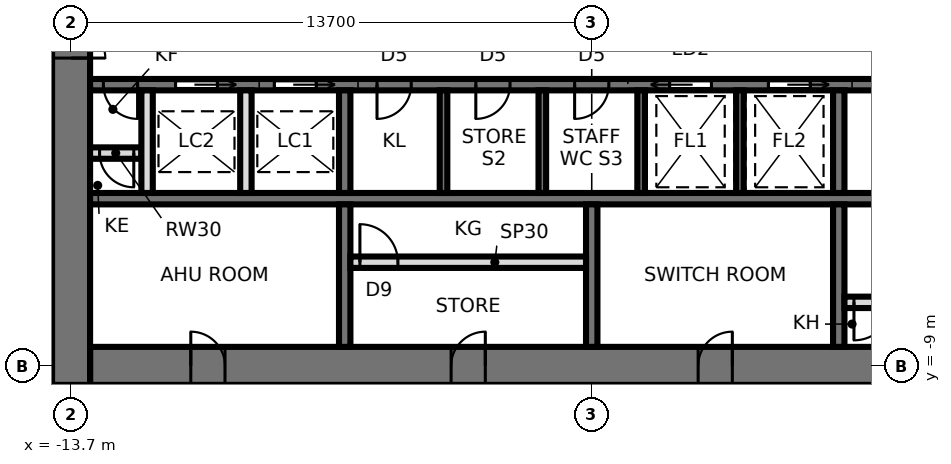
"""IFC4 building model, lengths in metres.
Left out: names, types, materials, properties, quantities, classifications, styles, units other than length and angle.
Written with IfcOpenShell. Run it as: python <this file> out.ifc"""

import sys

from ifc_helpers import new_model, si_unit, direction, frame, frame_2d, origin, place, context, subcontext, project, spatial, rectangle, extrude, element, fill, save


model = new_model("IFC4")
c1 = context("Model", 3, precision=1e-05, world=origin(), true_north=direction((0.0, 1.0)))
c2 = subcontext(c1, "Body", "Model", "MODEL_VIEW")
j1 = project(units=[si_unit("LENGTHUNIT", "METRE"), si_unit("PLANEANGLEUNIT", "RADIAN")], contexts=[c1])
p1 = place(None, origin())
s1 = spatial("IfcSite", under=j1, at=p1, CompositionType="ELEMENT")
p2 = place(p1, origin())
s2 = spatial("IfcBuilding", under=s1, at=p2, CompositionType="ELEMENT")
p3 = place(p2, frame((0.0, 0.0, 195.5)))
s3 = spatial("IfcBuildingStorey", under=s2, at=p3, CompositionType="ELEMENT", Elevation=195.5)
p4 = place(p3, frame((-13.2, -9.0, 0.0), z_axis=(0.0, 0.0, 1.0), x_axis=(1.0, 0.0, 0.0)))
e1 = element("IfcWall", 1, at=p4, inside=s3, PredefinedType="SHEAR", context=c2, shape_type="SweptSolid", body=[
    extrude(rectangle(XDim=26.4, YDim=1.0, at=frame_2d((13.2, 0.0))), origin(), (0.0, 0.0, 1.0), 3.9),
])
p5 = place(p4, frame((2.65, 0.0, 0.0)))
e2 = element("IfcOpeningElement", 2, at=p5, cuts=e1, PredefinedType="OPENING", context=c2, shape_type="SweptSolid", body=[
    extrude(rectangle(XDim=0.9, YDim=2.1, at=frame_2d((0.45, 1.05))), frame((0.0, 0.51, 0.0), z_axis=(0.0, -1.0, 0.0), x_axis=(1.0, 0.0, 0.0)), (0.0, 0.0, 1.0), 1.02),
])
p6 = place(p4, frame((9.5, 0.0, 0.0)))
e3 = element("IfcOpeningElement", 3, at=p6, cuts=e1, PredefinedType="OPENING", context=c2, shape_type="SweptSolid", body=[
    extrude(rectangle(XDim=0.9, YDim=2.1, at=frame_2d((0.45, 1.05))), frame((0.0, 0.51, 0.0), z_axis=(0.0, -1.0, 0.0), x_axis=(1.0, 0.0, 0.0)), (0.0, 0.0, 1.0), 1.02),
])
p7 = place(p4, frame((16.0, 0.0, 0.0)))
e4 = element("IfcOpeningElement", 4, at=p7, cuts=e1, PredefinedType="OPENING", context=c2, shape_type="SweptSolid", body=[
    extrude(rectangle(XDim=0.9, YDim=2.1, at=frame_2d((0.45, 1.05))), frame((0.0, 0.51, 0.0), z_axis=(0.0, -1.0, 0.0), x_axis=(1.0, 0.0, 0.0)), (0.0, 0.0, 1.0), 1.02),
])
p8 = place(p4, frame((22.85, 0.0, 0.0)))
e5 = element("IfcOpeningElement", 5, at=p8, cuts=e1, PredefinedType="OPENING", context=c2, shape_type="SweptSolid", body=[
    extrude(rectangle(XDim=0.9, YDim=2.1, at=frame_2d((0.45, 1.05))), frame((0.0, 0.51, 0.0), z_axis=(0.0, -1.0, 0.0), x_axis=(1.0, 0.0, 0.0)), (0.0, 0.0, 1.0), 1.02),
])
p9 = place(p3, frame((-13.7, 9.5, 0.0), z_axis=(0.0, 0.0, 1.0), x_axis=(0.0, -1.0, 0.0)))
e6 = element("IfcWall", 6, at=p9, inside=s3, PredefinedType="SHEAR", context=c2, shape_type="SweptSolid", body=[
    extrude(rectangle(XDim=19.0, YDim=1.0, at=frame_2d((9.5, 0.0))), origin(), (0.0, 0.0, 1.0), 3.9),
])
p10 = place(p9, frame((8.6, 0.0, 0.0)))
e7 = element("IfcOpeningElement", 7, at=p10, cuts=e6, PredefinedType="OPENING", context=c2, shape_type="SweptSolid", body=[
    extrude(rectangle(XDim=1.8, YDim=2.4, at=frame_2d((0.9, 1.2))), frame((0.0, 0.51, 0.0), z_axis=(0.0, -1.0, 0.0), x_axis=(1.0, 0.0, 0.0)), (0.0, 0.0, 1.0), 1.02),
])
p11 = place(p3, frame((-13.2, -1.6, 0.0), z_axis=(0.0, 0.0, 1.0), x_axis=(1.0, 0.0, 0.0)))
e8 = element("IfcWall", 8, at=p11, inside=s3, PredefinedType="SHEAR", context=c2, shape_type="SweptSolid", body=[
    extrude(rectangle(XDim=26.4, YDim=0.3, at=frame_2d((13.2, 0.0))), origin(), (0.0, 0.0, 1.0), 3.9),
])
p12 = place(p11, frame((25.15, 0.0, 0.0)))
e9 = element("IfcOpeningElement", 9, at=p12, cuts=e8, PredefinedType="OPENING", context=c2, shape_type="SweptSolid", body=[
    extrude(rectangle(XDim=1.0, YDim=2.1, at=frame_2d((0.5, 1.05))), frame((0.0, 0.16, 0.0), z_axis=(0.0, -1.0, 0.0), x_axis=(1.0, 0.0, 0.0)), (0.0, 0.0, 1.0), 0.32),
])
p13 = place(p11, frame((7.55, 0.0, 0.0)))
e10 = element("IfcOpeningElement", 10, at=p13, cuts=e8, PredefinedType="OPENING", context=c2, shape_type="SweptSolid", body=[
    extrude(rectangle(XDim=0.9, YDim=2.1, at=frame_2d((0.45, 1.05))), frame((0.0, 0.16, 0.0), z_axis=(0.0, -1.0, 0.0), x_axis=(1.0, 0.0, 0.0)), (0.0, 0.0, 1.0), 0.32),
])
p14 = place(p11, frame((10.15, 0.0, 0.0)))
e11 = element("IfcOpeningElement", 11, at=p14, cuts=e8, PredefinedType="OPENING", context=c2, shape_type="SweptSolid", body=[
    extrude(rectangle(XDim=0.9, YDim=2.1, at=frame_2d((0.45, 1.05))), frame((0.0, 0.16, 0.0), z_axis=(0.0, -1.0, 0.0), x_axis=(1.0, 0.0, 0.0)), (0.0, 0.0, 1.0), 0.32),
])
p15 = place(p11, frame((12.75, 0.0, 0.0)))
e12 = element("IfcOpeningElement", 12, at=p15, cuts=e8, PredefinedType="OPENING", context=c2, shape_type="SweptSolid", body=[
    extrude(rectangle(XDim=0.9, YDim=2.1, at=frame_2d((0.45, 1.05))), frame((0.0, 0.16, 0.0), z_axis=(0.0, -1.0, 0.0), x_axis=(1.0, 0.0, 0.0)), (0.0, 0.0, 1.0), 0.32),
])
p16 = place(p11, frame((15.25, 0.0, 0.0)))
e13 = element("IfcOpeningElement", 13, at=p16, cuts=e8, PredefinedType="OPENING", context=c2, shape_type="SweptSolid", body=[
    extrude(rectangle(XDim=1.1, YDim=2.3, at=frame_2d((0.55, 1.15))), frame((0.0, 0.16, 0.0), z_axis=(0.0, -1.0, 0.0), x_axis=(1.0, 0.0, 0.0)), (0.0, 0.0, 1.0), 0.32),
])
p17 = place(p11, frame((17.85, 0.0, 0.0)))
e14 = element("IfcOpeningElement", 14, at=p17, cuts=e8, PredefinedType="OPENING", context=c2, shape_type="SweptSolid", body=[
    extrude(rectangle(XDim=1.1, YDim=2.3, at=frame_2d((0.55, 1.15))), frame((0.0, 0.16, 0.0), z_axis=(0.0, -1.0, 0.0), x_axis=(1.0, 0.0, 0.0)), (0.0, 0.0, 1.0), 0.32),
])
p18 = place(p11, frame((4.85, 0.0, 0.0)))
e15 = element("IfcOpeningElement", 15, at=p18, cuts=e8, PredefinedType="OPENING", context=c2, shape_type="SweptSolid", body=[
    extrude(rectangle(XDim=1.1, YDim=2.3, at=frame_2d((0.55, 1.15))), frame((0.0, 0.16, 0.0), z_axis=(0.0, -1.0, 0.0), x_axis=(1.0, 0.0, 0.0)), (0.0, 0.0, 1.0), 0.32),
])
p19 = place(p11, frame((2.25, 0.0, 0.0)))
e16 = element("IfcOpeningElement", 16, at=p19, cuts=e8, PredefinedType="OPENING", context=c2, shape_type="SweptSolid", body=[
    extrude(rectangle(XDim=1.1, YDim=2.3, at=frame_2d((0.55, 1.15))), frame((0.0, 0.16, 0.0), z_axis=(0.0, -1.0, 0.0), x_axis=(1.0, 0.0, 0.0)), (0.0, 0.0, 1.0), 0.32),
])
p20 = place(p11, frame((0.35, 0.0, 0.0)))
e17 = element("IfcOpeningElement", 17, at=p20, cuts=e8, PredefinedType="OPENING", context=c2, shape_type="SweptSolid", body=[
    extrude(rectangle(XDim=0.9, YDim=2.1, at=frame_2d((0.45, 1.05))), frame((0.0, 0.16, 0.0), z_axis=(0.0, -1.0, 0.0), x_axis=(1.0, 0.0, 0.0)), (0.0, 0.0, 1.0), 0.32),
])
p21 = place(p3, frame((-13.2, -4.6, 0.0), z_axis=(0.0, 0.0, 1.0), x_axis=(1.0, 0.0, 0.0)))
e18 = element("IfcWall", 18, at=p21, inside=s3, PredefinedType="SHEAR", context=c2, shape_type="SweptSolid", body=[
    extrude(rectangle(XDim=26.4, YDim=0.3, at=frame_2d((13.2, 0.0))), origin(), (0.0, 0.0, 1.0), 3.9),
])
p22 = place(p3, frame((-6.5, -1.75, 0.0), z_axis=(0.0, 0.0, 1.0), x_axis=(0.0, -1.0, 0.0)))
e19 = element("IfcWall", 19, at=p22, inside=s3, PredefinedType="SHEAR", context=c2, shape_type="SweptSolid", body=[
    extrude(rectangle(XDim=2.7, YDim=0.3, at=frame_2d((1.35, 0.0))), origin(), (0.0, 0.0, 1.0), 3.9),
])
p23 = place(p3, frame((-6.5, -4.75, 0.0), z_axis=(0.0, 0.0, 1.0), x_axis=(0.0, -1.0, 0.0)))
e20 = element("IfcWall", 20, at=p23, inside=s3, PredefinedType="SHEAR", context=c2, shape_type="SweptSolid", body=[
    extrude(rectangle(XDim=3.75, YDim=0.3, at=frame_2d((1.875, 0.0))), origin(), (0.0, 0.0, 1.0), 3.9),
])
p24 = place(p3, frame((6.5, -1.75, 0.0), z_axis=(0.0, 0.0, 1.0), x_axis=(0.0, -1.0, 0.0)))
e21 = element("IfcWall", 21, at=p24, inside=s3, PredefinedType="SHEAR", context=c2, shape_type="SweptSolid", body=[
    extrude(rectangle(XDim=2.7, YDim=0.3, at=frame_2d((1.35, 0.0))), origin(), (0.0, 0.0, 1.0), 3.9),
])
p25 = place(p3, frame((6.5, -4.75, 0.0), z_axis=(0.0, 0.0, 1.0), x_axis=(0.0, -1.0, 0.0)))
e22 = element("IfcWall", 22, at=p25, inside=s3, PredefinedType="SHEAR", context=c2, shape_type="SweptSolid", body=[
    extrude(rectangle(XDim=3.75, YDim=0.3, at=frame_2d((1.875, 0.0))), origin(), (0.0, 0.0, 1.0), 3.9),
])
for number, where, z_axis, x_axis in (
    (23, (-3.9, -1.75, 0.0), (0.0, 0.0, 1.0), (0.0, -1.0, 0.0)),
    (24, (-1.3, -1.75, 0.0), (0.0, 0.0, 1.0), (0.0, -1.0, 0.0)),
    (25, (1.3, -1.75, 0.0), (0.0, 0.0, 1.0), (0.0, -1.0, 0.0)),
    (26, (3.9, -1.75, 0.0), (0.0, 0.0, 1.0), (0.0, -1.0, 0.0)),
):
    element("IfcWall", number, at=place(p3, frame(where, z_axis=z_axis, x_axis=x_axis)), inside=s3, PredefinedType="SHEAR", context=c2, shape_type="SweptSolid", body=[
        extrude(rectangle(XDim=2.7, YDim=0.2, at=frame_2d((1.35, 0.0))), origin(), (0.0, 0.0, 1.0), 3.9),
    ])
p26 = place(p3, frame((0.0, -4.75, 0.0), z_axis=(0.0, 0.0, 1.0), x_axis=(0.0, -1.0, 0.0)))
e27 = element("IfcWall", 27, at=p26, inside=s3, PredefinedType="SHEAR", context=c2, shape_type="SweptSolid", body=[
    extrude(rectangle(XDim=3.75, YDim=0.3, at=frame_2d((1.875, 0.0))), origin(), (0.0, 0.0, 1.0), 3.9),
])
p27 = place(p3, frame((-6.35, -6.272, 0.0), z_axis=(0.0, 0.0, 1.0), x_axis=(1.0, 0.0, 0.0)))
e28 = element("IfcWall", 28, at=p27, inside=s3, PredefinedType="PARTITIONING", context=c2, shape_type="SweptSolid", body=[
    extrude(rectangle(XDim=6.2, YDim=0.3, at=frame_2d((3.1, 0.0))), origin(), (0.0, 0.0, 1.0), 3.74),
])
p28 = place(p27, frame((0.25, 0.0, 0.0)))
e29 = element("IfcOpeningElement", 29, at=p28, cuts=e28, PredefinedType="OPENING", context=c2, shape_type="SweptSolid", body=[
    extrude(rectangle(XDim=1.0, YDim=2.4, at=frame_2d((0.5, 1.2))), frame((0.0, 0.16, 0.0), z_axis=(0.0, -1.0, 0.0), x_axis=(1.0, 0.0, 0.0)), (0.0, 0.0, 1.0), 0.32),
])
p29 = place(p3, frame((6.65, -7.328, 0.0), z_axis=(0.0, 0.0, 1.0), x_axis=(1.0, 0.0, 0.0)))
e30 = element("IfcWall", 30, at=p29, inside=s3, PredefinedType="PARTITIONING", context=c2, shape_type="SweptSolid", body=[
    extrude(rectangle(XDim=6.55, YDim=0.3, at=frame_2d((3.275, 0.0))), origin(), (0.0, 0.0, 1.0), 3.74),
])
p30 = place(p29, frame((0.25, 0.0, 0.0)))
e31 = element("IfcOpeningElement", 31, at=p30, cuts=e30, PredefinedType="OPENING", context=c2, shape_type="SweptSolid", body=[
    extrude(rectangle(XDim=1.0, YDim=2.4, at=frame_2d((0.5, 1.2))), frame((0.0, 0.16, 0.0), z_axis=(0.0, -1.0, 0.0), x_axis=(1.0, 0.0, 0.0)), (0.0, 0.0, 1.0), 0.32),
])
p31 = place(p3, frame((-13.2, -3.4, 0.0), z_axis=(0.0, 0.0, 1.0), x_axis=(1.0, 0.0, 0.0)))
e32 = element("IfcWall", 32, at=p31, inside=s3, PredefinedType="SOLIDWALL", context=c2, shape_type="SweptSolid", body=[
    extrude(rectangle(XDim=1.35, YDim=0.3, at=frame_2d((0.675, 0.0))), origin(), (0.0, 0.0, 1.0), 3.74),
])
p32 = place(p31, frame((0.25, 0.0, 0.0)))
e33 = element("IfcOpeningElement", 33, at=p32, cuts=e32, PredefinedType="OPENING", context=c2, shape_type="SweptSolid", body=[
    extrude(rectangle(XDim=0.9, YDim=2.1, at=frame_2d((0.45, 1.05))), frame((0.0, 0.16, 0.0), z_axis=(0.0, -1.0, 0.0), x_axis=(1.0, 0.0, 0.0)), (0.0, 0.0, 1.0), 0.32),
])
for number, where, z_axis, x_axis in (
    (34, (-9.1, -1.75, 0.0), (0.0, 0.0, 1.0), (0.0, -1.0, 0.0)),
    (35, (-11.7, -1.75, 0.0), (0.0, 0.0, 1.0), (0.0, -1.0, 0.0)),
):
    element("IfcWall", number, at=place(p3, frame(where, z_axis=z_axis, x_axis=x_axis)), inside=s3, PredefinedType="SOLIDWALL", context=c2, shape_type="SweptSolid", body=[
        extrude(rectangle(XDim=2.7, YDim=0.3, at=frame_2d((1.35, 0.0))), origin(), (0.0, 0.0, 1.0), 3.74),
    ])
p33 = place(p10, origin())
e36 = element("IfcDoor", 36, at=p33, inside=s3, OperationType="DOUBLE_DOOR_SINGLE_SWING", PredefinedType="DOOR", context=c2, shape_type="SweptSolid", body=[
    extrude(rectangle(XDim=1.72, YDim=2.36, at=frame_2d((0.9, 1.18))), frame((0.0, 0.025, 0.0), z_axis=(0.0, -1.0, 0.0), x_axis=(1.0, 0.0, 0.0)), (0.0, 0.0, 1.0), 0.05),
    extrude(rectangle(XDim=0.04, YDim=2.4, at=frame_2d((0.02, 1.2))), frame((0.0, 0.25, 0.0), z_axis=(0.0, -1.0, 0.0), x_axis=(1.0, 0.0, 0.0)), (0.0, 0.0, 1.0), 0.5),
    extrude(rectangle(XDim=0.04, YDim=2.4, at=frame_2d((1.78, 1.2))), frame((0.0, 0.25, 0.0), z_axis=(0.0, -1.0, 0.0), x_axis=(1.0, 0.0, 0.0)), (0.0, 0.0, 1.0), 0.5),
    extrude(rectangle(XDim=1.72, YDim=0.04, at=frame_2d((0.9, 2.38))), frame((0.0, 0.25, 0.0), z_axis=(0.0, -1.0, 0.0), x_axis=(1.0, 0.0, 0.0)), (0.0, 0.0, 1.0), 0.5),
])
fill(e7, e36)
p34 = place(p13, frame((0.9, 0.0, 0.0), z_axis=(0.0, 0.0, 1.0), x_axis=(-1.0, 0.0, 0.0)))
e37 = element("IfcDoor", 37, at=p34, inside=s3, OperationType="SINGLE_SWING_RIGHT", PredefinedType="DOOR", context=c2, shape_type="SweptSolid", body=[
    extrude(rectangle(XDim=0.9, YDim=2.1, at=frame_2d((0.45, 1.05))), frame((0.0, 0.025, 0.0), z_axis=(0.0, -1.0, 0.0), x_axis=(1.0, 0.0, 0.0)), (0.0, 0.0, 1.0), 0.05),
])
fill(e10, e37)
p35 = place(p14, frame((0.9, 0.0, 0.0), z_axis=(0.0, 0.0, 1.0), x_axis=(-1.0, 0.0, 0.0)))
e38 = element("IfcDoor", 38, at=p35, inside=s3, OperationType="SINGLE_SWING_RIGHT", PredefinedType="DOOR", context=c2, shape_type="SweptSolid", body=[
    extrude(rectangle(XDim=0.9, YDim=2.1, at=frame_2d((0.45, 1.05))), frame((0.0, 0.025, 0.0), z_axis=(0.0, -1.0, 0.0), x_axis=(1.0, 0.0, 0.0)), (0.0, 0.0, 1.0), 0.05),
])
fill(e11, e38)
p36 = place(p15, frame((0.9, 0.0, 0.0), z_axis=(0.0, 0.0, 1.0), x_axis=(-1.0, 0.0, 0.0)))
e39 = element("IfcDoor", 39, at=p36, inside=s3, OperationType="SINGLE_SWING_RIGHT", PredefinedType="DOOR", context=c2, shape_type="SweptSolid", body=[
    extrude(rectangle(XDim=0.9, YDim=2.1, at=frame_2d((0.45, 1.05))), frame((0.0, 0.025, 0.0), z_axis=(0.0, -1.0, 0.0), x_axis=(1.0, 0.0, 0.0)), (0.0, 0.0, 1.0), 0.05),
])
fill(e12, e39)
p37 = place(p16, frame((1.1, 0.0, 0.0), z_axis=(0.0, 0.0, 1.0), x_axis=(-1.0, 0.0, 0.0)))
e40 = element("IfcDoor", 40, at=p37, inside=s3, OperationType="SLIDING_TO_RIGHT", PredefinedType="DOOR", context=c2, shape_type="SweptSolid", body=[
    extrude(rectangle(XDim=1.1, YDim=2.3, at=frame_2d((0.55, 1.15))), frame((0.0, 0.025, 0.0), z_axis=(0.0, -1.0, 0.0), x_axis=(1.0, 0.0, 0.0)), (0.0, 0.0, 1.0), 0.05),
])
fill(e13, e40)
p38 = place(p17, frame((1.1, 0.0, 0.0), z_axis=(0.0, 0.0, 1.0), x_axis=(-1.0, 0.0, 0.0)))
e41 = element("IfcDoor", 41, at=p38, inside=s3, OperationType="SLIDING_TO_LEFT", PredefinedType="DOOR", context=c2, shape_type="SweptSolid", body=[
    extrude(rectangle(XDim=1.1, YDim=2.3, at=frame_2d((0.55, 1.15))), frame((0.0, 0.025, 0.0), z_axis=(0.0, -1.0, 0.0), x_axis=(1.0, 0.0, 0.0)), (0.0, 0.0, 1.0), 0.05),
])
fill(e14, e41)
p39 = place(p18, frame((1.1, 0.0, 0.0), z_axis=(0.0, 0.0, 1.0), x_axis=(-1.0, 0.0, 0.0)))
e42 = element("IfcDoor", 42, at=p39, inside=s3, OperationType="SLIDING_TO_LEFT", PredefinedType="DOOR", context=c2, shape_type="SweptSolid", body=[
    extrude(rectangle(XDim=1.1, YDim=2.3, at=frame_2d((0.55, 1.15))), frame((0.0, 0.025, 0.0), z_axis=(0.0, -1.0, 0.0), x_axis=(1.0, 0.0, 0.0)), (0.0, 0.0, 1.0), 0.05),
])
fill(e15, e42)
p40 = place(p19, frame((1.1, 0.0, 0.0), z_axis=(0.0, 0.0, 1.0), x_axis=(-1.0, 0.0, 0.0)))
e43 = element("IfcDoor", 43, at=p40, inside=s3, OperationType="SLIDING_TO_LEFT", PredefinedType="DOOR", context=c2, shape_type="SweptSolid", body=[
    extrude(rectangle(XDim=1.1, YDim=2.3, at=frame_2d((0.55, 1.15))), frame((0.0, 0.025, 0.0), z_axis=(0.0, -1.0, 0.0), x_axis=(1.0, 0.0, 0.0)), (0.0, 0.0, 1.0), 0.05),
])
fill(e16, e43)
p41 = place(p20, frame((0.9, 0.0, 0.0), z_axis=(0.0, 0.0, 1.0), x_axis=(-1.0, 0.0, 0.0)))
e44 = element("IfcDoor", 44, at=p41, inside=s3, OperationType="SINGLE_SWING_LEFT", PredefinedType="DOOR", context=c2, shape_type="SweptSolid", body=[
    extrude(rectangle(XDim=0.9, YDim=2.1, at=frame_2d((0.45, 1.05))), frame((0.0, 0.025, 0.0), z_axis=(0.0, -1.0, 0.0), x_axis=(1.0, 0.0, 0.0)), (0.0, 0.0, 1.0), 0.05),
])
fill(e17, e44)
p42 = place(p5, origin())
e45 = element("IfcDoor", 45, at=p42, inside=s3, OperationType="SINGLE_SWING_LEFT", PredefinedType="DOOR", context=c2, shape_type="SweptSolid", body=[
    extrude(rectangle(XDim=0.82, YDim=2.06, at=frame_2d((0.45, 1.03))), frame((0.0, 0.025, 0.0), z_axis=(0.0, -1.0, 0.0), x_axis=(1.0, 0.0, 0.0)), (0.0, 0.0, 1.0), 0.05),
    extrude(rectangle(XDim=0.04, YDim=2.1, at=frame_2d((0.02, 1.05))), frame((0.0, 0.25, 0.0), z_axis=(0.0, -1.0, 0.0), x_axis=(1.0, 0.0, 0.0)), (0.0, 0.0, 1.0), 0.5),
    extrude(rectangle(XDim=0.04, YDim=2.1, at=frame_2d((0.88, 1.05))), frame((0.0, 0.25, 0.0), z_axis=(0.0, -1.0, 0.0), x_axis=(1.0, 0.0, 0.0)), (0.0, 0.0, 1.0), 0.5),
    extrude(rectangle(XDim=0.82, YDim=0.04, at=frame_2d((0.45, 2.08))), frame((0.0, 0.25, 0.0), z_axis=(0.0, -1.0, 0.0), x_axis=(1.0, 0.0, 0.0)), (0.0, 0.0, 1.0), 0.5),
])
fill(e2, e45)
p43 = place(p6, origin())
e46 = element("IfcDoor", 46, at=p43, inside=s3, OperationType="SINGLE_SWING_RIGHT", PredefinedType="DOOR", context=c2, shape_type="SweptSolid", body=[
    extrude(rectangle(XDim=0.82, YDim=2.06, at=frame_2d((0.45, 1.03))), frame((0.0, 0.025, 0.0), z_axis=(0.0, -1.0, 0.0), x_axis=(1.0, 0.0, 0.0)), (0.0, 0.0, 1.0), 0.05),
    extrude(rectangle(XDim=0.04, YDim=2.1, at=frame_2d((0.02, 1.05))), frame((0.0, 0.25, 0.0), z_axis=(0.0, -1.0, 0.0), x_axis=(1.0, 0.0, 0.0)), (0.0, 0.0, 1.0), 0.5),
    extrude(rectangle(XDim=0.04, YDim=2.1, at=frame_2d((0.88, 1.05))), frame((0.0, 0.25, 0.0), z_axis=(0.0, -1.0, 0.0), x_axis=(1.0, 0.0, 0.0)), (0.0, 0.0, 1.0), 0.5),
    extrude(rectangle(XDim=0.82, YDim=0.04, at=frame_2d((0.45, 2.08))), frame((0.0, 0.25, 0.0), z_axis=(0.0, -1.0, 0.0), x_axis=(1.0, 0.0, 0.0)), (0.0, 0.0, 1.0), 0.5),
])
fill(e3, e46)
p44 = place(p7, origin())
e47 = element("IfcDoor", 47, at=p44, inside=s3, OperationType="SINGLE_SWING_RIGHT", PredefinedType="DOOR", context=c2, shape_type="SweptSolid", body=[
    extrude(rectangle(XDim=0.82, YDim=2.06, at=frame_2d((0.45, 1.03))), frame((0.0, 0.025, 0.0), z_axis=(0.0, -1.0, 0.0), x_axis=(1.0, 0.0, 0.0)), (0.0, 0.0, 1.0), 0.05),
    extrude(rectangle(XDim=0.04, YDim=2.1, at=frame_2d((0.02, 1.05))), frame((0.0, 0.25, 0.0), z_axis=(0.0, -1.0, 0.0), x_axis=(1.0, 0.0, 0.0)), (0.0, 0.0, 1.0), 0.5),
    extrude(rectangle(XDim=0.04, YDim=2.1, at=frame_2d((0.88, 1.05))), frame((0.0, 0.25, 0.0), z_axis=(0.0, -1.0, 0.0), x_axis=(1.0, 0.0, 0.0)), (0.0, 0.0, 1.0), 0.5),
    extrude(rectangle(XDim=0.82, YDim=0.04, at=frame_2d((0.45, 2.08))), frame((0.0, 0.25, 0.0), z_axis=(0.0, -1.0, 0.0), x_axis=(1.0, 0.0, 0.0)), (0.0, 0.0, 1.0), 0.5),
])
fill(e4, e47)
p45 = place(p28, origin())
e48 = element("IfcDoor", 48, at=p45, inside=s3, OperationType="SINGLE_SWING_LEFT", PredefinedType="DOOR", context=c2, shape_type="SweptSolid", body=[
    extrude(rectangle(XDim=1.0, YDim=2.4, at=frame_2d((0.5, 1.2))), frame((0.0, 0.025, 0.0), z_axis=(0.0, -1.0, 0.0), x_axis=(1.0, 0.0, 0.0)), (0.0, 0.0, 1.0), 0.05),
])
fill(e29, e48)
p46 = place(p30, frame((1.0, 0.0, 0.0), z_axis=(0.0, 0.0, 1.0), x_axis=(-1.0, 0.0, 0.0)))
e49 = element("IfcDoor", 49, at=p46, inside=s3, OperationType="SINGLE_SWING_RIGHT", PredefinedType="DOOR", context=c2, shape_type="SweptSolid", body=[
    extrude(rectangle(XDim=1.0, YDim=2.4, at=frame_2d((0.5, 1.2))), frame((0.0, 0.025, 0.0), z_axis=(0.0, -1.0, 0.0), x_axis=(1.0, 0.0, 0.0)), (0.0, 0.0, 1.0), 0.05),
])
fill(e31, e49)
p47 = place(p32, frame((0.9, 0.0, 0.0), z_axis=(0.0, 0.0, 1.0), x_axis=(-1.0, 0.0, 0.0)))
e50 = element("IfcDoor", 50, at=p47, inside=s3, OperationType="SINGLE_SWING_LEFT", PredefinedType="DOOR", context=c2, shape_type="SweptSolid", body=[
    extrude(rectangle(XDim=0.9, YDim=2.1, at=frame_2d((0.45, 1.05))), frame((0.0, 0.025, 0.0), z_axis=(0.0, -1.0, 0.0), x_axis=(1.0, 0.0, 0.0)), (0.0, 0.0, 1.0), 0.05),
])
fill(e33, e50)
save(model, sys.argv[1])
